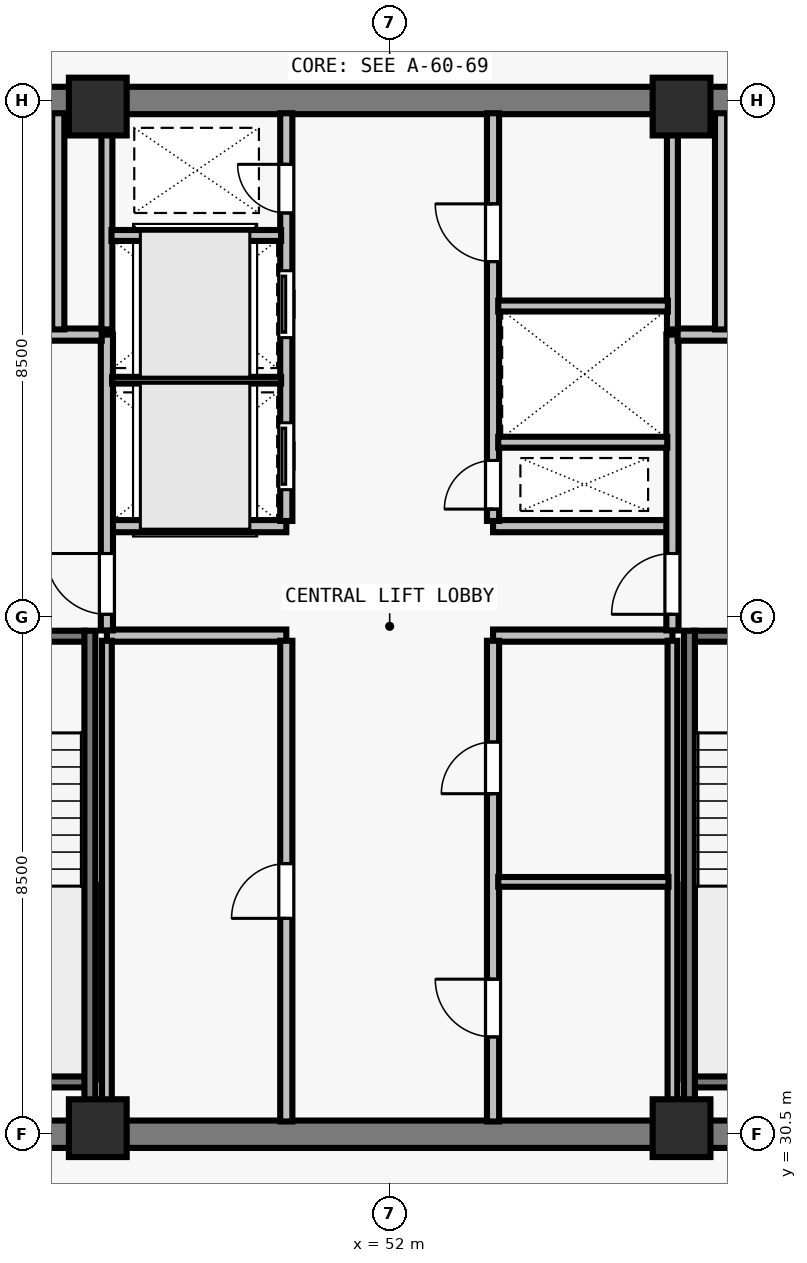
"""IFC4 building model, lengths in metres.
Left out: names, types, materials, properties, quantities, classifications, styles, units other than length and angle.
Written with IfcOpenShell. Run it as: python <this file> out.ifc"""

import sys

from ifc_helpers import new_model, si_unit, direction, frame, frame_2d, origin, origin_2d, place, context, subcontext, project, spatial, rectangle, extrude, element, fill, save


model = new_model("IFC4")
c1 = context("Model", 3, precision=1e-05, world=origin(), true_north=direction((0.0, 1.0)))
c2 = subcontext(c1, "Body", "Model", "MODEL_VIEW")
j1 = project(units=[si_unit("LENGTHUNIT", "METRE"), si_unit("PLANEANGLEUNIT", "RADIAN")], contexts=[c1])
p1 = place(None, origin())
s1 = spatial("IfcSite", under=j1, at=p1, CompositionType="ELEMENT")
p2 = place(p1, origin())
s2 = spatial("IfcBuilding", under=s1, at=p2, CompositionType="ELEMENT")
p3 = place(p2, frame((0.0, 0.0, 241.0)))
s3 = spatial("IfcBuildingStorey", under=s2, at=p3, CompositionType="ELEMENT", Elevation=241.0)
for number, where, z_axis, x_axis in (
    (1, (47.2, 30.6, 0.0), (0.0, 0.0, 1.0), (1.0, 0.0, 0.0)),
    (2, (56.8, 30.6, 0.0), (0.0, 0.0, 1.0), (1.0, 0.0, 0.0)),
    (3, (47.2, 47.4, 0.0), (0.0, 0.0, 1.0), (1.0, 0.0, 0.0)),
    (4, (56.8, 47.4, 0.0), (0.0, 0.0, 1.0), (1.0, 0.0, 0.0)),
):
    element("IfcColumn", number, at=place(p3, frame(where, z_axis=z_axis, x_axis=x_axis)), inside=s3, PredefinedType="COLUMN", context=c2, shape_type="SweptSolid", body=[
        extrude(rectangle(XDim=0.95, YDim=0.95, at=origin_2d()), origin(), (0.0, 0.0, 1.0), 3.5),
    ])
for number, where, z_axis, x_axis in (
    (5, (43.275, 30.5, 0.0), (0.0, 0.0, 1.0), (1.0, 0.0, 0.0)),
    (6, (43.275, 47.5, 0.0), (0.0, 0.0, 1.0), (1.0, 0.0, 0.0)),
):
    element("IfcWall", number, at=place(p3, frame(where, z_axis=z_axis, x_axis=x_axis)), inside=s3, PredefinedType="SHEAR", context=c2, shape_type="SweptSolid", body=[
        extrude(rectangle(XDim=17.45, YDim=0.45, at=frame_2d((8.725, 0.0))), origin(), (0.0, 0.0, 1.0), 3.29),
    ])
for number, where, z_axis, x_axis in (
    (7, (47.35, 38.7, 0.0), (0.0, 0.0, 1.0), (1.0, 0.0, 0.0)),
    (8, (47.35, 40.5, 0.0), (0.0, 0.0, 1.0), (1.0, 0.0, 0.0)),
    (9, (53.7, 38.7, 0.0), (0.0, 0.0, 1.0), (1.0, 0.0, 0.0)),
    (10, (53.7, 40.5, 0.0), (0.0, 0.0, 1.0), (1.0, 0.0, 0.0)),
):
    element("IfcWall", number, at=place(p3, frame(where, z_axis=z_axis, x_axis=x_axis)), inside=s3, PredefinedType="SOLIDWALL", context=c2, shape_type="SweptSolid", body=[
        extrude(rectangle(XDim=2.95, YDim=0.2, at=frame_2d((1.475, 0.0))), origin(), (0.0, 0.0, 1.0), 3.29),
    ])
p4 = place(p3, frame((50.3, 30.71, 0.0), z_axis=(0.0, 0.0, 1.0), x_axis=(0.0, 1.0, 0.0)))
e11 = element("IfcWall", 11, at=p4, inside=s3, PredefinedType="SOLIDWALL", context=c2, shape_type="SweptSolid", body=[
    extrude(rectangle(XDim=7.905, YDim=0.2, at=frame_2d((3.953, 0.0))), origin(), (0.0, 0.0, 1.0), 3.29),
])
p5 = place(p4, frame((3.34, 0.0, 0.0)))
e12 = element("IfcOpeningElement", 12, at=p5, cuts=e11, PredefinedType="OPENING", context=c2, shape_type="SweptSolid", body=[
    extrude(rectangle(XDim=0.9, YDim=2.12, at=frame_2d((0.45, 1.06))), frame((0.0, 0.11, 0.0), z_axis=(0.0, -1.0, 0.0), x_axis=(1.0, 0.0, 0.0)), (0.0, 0.0, 1.0), 0.22),
])
p6 = place(p3, frame((53.7, 30.71, 0.0), z_axis=(0.0, 0.0, 1.0), x_axis=(0.0, 1.0, 0.0)))
e13 = element("IfcWall", 13, at=p6, inside=s3, PredefinedType="SOLIDWALL", context=c2, shape_type="SweptSolid", body=[
    extrude(rectangle(XDim=7.905, YDim=0.2, at=frame_2d((3.953, 0.0))), origin(), (0.0, 0.0, 1.0), 3.29),
])
p7 = place(p6, frame((1.39, 0.0, 0.0)))
e14 = element("IfcOpeningElement", 14, at=p7, cuts=e13, PredefinedType="OPENING", context=c2, shape_type="SweptSolid", body=[
    extrude(rectangle(XDim=0.95, YDim=2.12, at=frame_2d((0.475, 1.06))), frame((0.0, 0.11, 0.0), z_axis=(0.0, -1.0, 0.0), x_axis=(1.0, 0.0, 0.0)), (0.0, 0.0, 1.0), 0.22),
])
p8 = place(p6, frame((5.39, 0.0, 0.0)))
e15 = element("IfcOpeningElement", 15, at=p8, cuts=e13, PredefinedType="OPENING", context=c2, shape_type="SweptSolid", body=[
    extrude(rectangle(XDim=0.85, YDim=2.12, at=frame_2d((0.425, 1.06))), frame((0.0, 0.11, 0.0), z_axis=(0.0, -1.0, 0.0), x_axis=(1.0, 0.0, 0.0)), (0.0, 0.0, 1.0), 0.22),
])
p9 = place(p3, frame((50.3, 40.585, 0.0), z_axis=(0.0, 0.0, 1.0), x_axis=(0.0, 1.0, 0.0)))
e16 = element("IfcWall", 16, at=p9, inside=s3, PredefinedType="SOLIDWALL", context=c2, shape_type="SweptSolid", body=[
    extrude(rectangle(XDim=6.705, YDim=0.2, at=frame_2d((3.353, 0.0))), origin(), (0.0, 0.0, 1.0), 3.29),
])
p10 = place(p9, frame((0.515, 0.0, 0.0)))
e17 = element("IfcOpeningElement", 17, at=p10, cuts=e16, PredefinedType="OPENING", context=c2, shape_type="SweptSolid", body=[
    extrude(rectangle(XDim=1.1, YDim=2.2, at=frame_2d((0.55, 1.1))), frame((0.0, 0.11, 0.0), z_axis=(0.0, -1.0, 0.0), x_axis=(1.0, 0.0, 0.0)), (0.0, 0.0, 1.0), 0.22),
])
p11 = place(p9, frame((3.015, 0.0, 0.0)))
e18 = element("IfcOpeningElement", 18, at=p11, cuts=e16, PredefinedType="OPENING", context=c2, shape_type="SweptSolid", body=[
    extrude(rectangle(XDim=1.1, YDim=2.2, at=frame_2d((0.55, 1.1))), frame((0.0, 0.11, 0.0), z_axis=(0.0, -1.0, 0.0), x_axis=(1.0, 0.0, 0.0)), (0.0, 0.0, 1.0), 0.22),
])
p12 = place(p9, frame((5.065, 0.0, 0.0)))
e19 = element("IfcOpeningElement", 19, at=p12, cuts=e16, PredefinedType="OPENING", context=c2, shape_type="SweptSolid", body=[
    extrude(rectangle(XDim=0.8, YDim=2.08, at=frame_2d((0.4, 1.04))), frame((0.0, 0.11, 0.0), z_axis=(0.0, -1.0, 0.0), x_axis=(1.0, 0.0, 0.0)), (0.0, 0.0, 1.0), 0.22),
])
p13 = place(p3, frame((53.7, 40.585, 0.0), z_axis=(0.0, 0.0, 1.0), x_axis=(0.0, 1.0, 0.0)))
e20 = element("IfcWall", 20, at=p13, inside=s3, PredefinedType="SOLIDWALL", context=c2, shape_type="SweptSolid", body=[
    extrude(rectangle(XDim=6.705, YDim=0.2, at=frame_2d((3.353, 0.0))), origin(), (0.0, 0.0, 1.0), 3.29),
])
p14 = place(p13, frame((0.195, 0.0, 0.0)))
e21 = element("IfcOpeningElement", 21, at=p14, cuts=e20, PredefinedType="OPENING", context=c2, shape_type="SweptSolid", body=[
    extrude(rectangle(XDim=0.8, YDim=2.08, at=frame_2d((0.4, 1.04))), frame((0.0, 0.11, 0.0), z_axis=(0.0, -1.0, 0.0), x_axis=(1.0, 0.0, 0.0)), (0.0, 0.0, 1.0), 0.22),
])
p15 = place(p13, frame((4.265, 0.0, 0.0)))
e22 = element("IfcOpeningElement", 22, at=p15, cuts=e20, PredefinedType="OPENING", context=c2, shape_type="SweptSolid", body=[
    extrude(rectangle(XDim=0.95, YDim=2.12, at=frame_2d((0.475, 1.06))), frame((0.0, 0.11, 0.0), z_axis=(0.0, -1.0, 0.0), x_axis=(1.0, 0.0, 0.0)), (0.0, 0.0, 1.0), 0.22),
])
p16 = place(p3, frame((47.35, 38.785, 0.0), z_axis=(0.0, 0.0, 1.0), x_axis=(0.0, 1.0, 0.0)))
e23 = element("IfcWall", 23, at=p16, inside=s3, PredefinedType="SOLIDWALL", context=c2, shape_type="SweptSolid", body=[
    extrude(rectangle(XDim=4.865, YDim=0.2, at=frame_2d((2.433, 0.0))), origin(), (0.0, 0.0, 1.0), 3.29),
])
p17 = place(p16, frame((0.265, 0.0, 0.0)))
e24 = element("IfcOpeningElement", 24, at=p17, cuts=e23, PredefinedType="OPENING", context=c2, shape_type="SweptSolid", body=[
    extrude(rectangle(XDim=1.0, YDim=2.15, at=frame_2d((0.5, 1.075))), frame((0.0, 0.11, 0.0), z_axis=(0.0, -1.0, 0.0), x_axis=(1.0, 0.0, 0.0)), (0.0, 0.0, 1.0), 0.22),
])
p18 = place(p3, frame((43.71, 43.65, 0.0), z_axis=(0.0, 0.0, 1.0), x_axis=(1.0, 0.0, 0.0)))
e25 = element("IfcWall", 25, at=p18, inside=s3, PredefinedType="SOLIDWALL", context=c2, shape_type="SweptSolid", body=[
    extrude(rectangle(XDim=3.555, YDim=0.2, at=frame_2d((1.777, 0.0))), origin(), (0.0, 0.0, 1.0), 3.29),
])
p19 = place(p18, frame((1.16, 0.0, 0.0)))
e26 = element("IfcOpeningElement", 26, at=p19, cuts=e25, PredefinedType="OPENING", context=c2, shape_type="SweptSolid", body=[
    extrude(rectangle(XDim=1.1, YDim=2.2, at=frame_2d((0.55, 1.1))), frame((0.0, 0.11, 0.0), z_axis=(0.0, -1.0, 0.0), x_axis=(1.0, 0.0, 0.0)), (0.0, 0.0, 1.0), 0.22),
])
p20 = place(p3, frame((46.55, 43.735, 0.0), z_axis=(0.0, 0.0, 1.0), x_axis=(0.0, 1.0, 0.0)))
e27 = element("IfcWall", 27, at=p20, inside=s3, PredefinedType="SOLIDWALL", context=c2, shape_type="SweptSolid", body=[
    extrude(rectangle(XDim=3.555, YDim=0.2, at=frame_2d((1.777, 0.0))), origin(), (0.0, 0.0, 1.0), 3.29),
])
p21 = place(p3, frame((56.65, 38.785, 0.0), z_axis=(0.0, 0.0, 1.0), x_axis=(0.0, 1.0, 0.0)))
e28 = element("IfcWall", 28, at=p21, inside=s3, PredefinedType="SOLIDWALL", context=c2, shape_type="SweptSolid", body=[
    extrude(rectangle(XDim=4.865, YDim=0.2, at=frame_2d((2.433, 0.0))), origin(), (0.0, 0.0, 1.0), 3.29),
])
p22 = place(p21, frame((0.265, 0.0, 0.0)))
e29 = element("IfcOpeningElement", 29, at=p22, cuts=e28, PredefinedType="OPENING", context=c2, shape_type="SweptSolid", body=[
    extrude(rectangle(XDim=1.0, YDim=2.15, at=frame_2d((0.5, 1.075))), frame((0.0, 0.11, 0.0), z_axis=(0.0, -1.0, 0.0), x_axis=(1.0, 0.0, 0.0)), (0.0, 0.0, 1.0), 0.22),
])
p23 = place(p3, frame((56.735, 43.65, 0.0), z_axis=(0.0, 0.0, 1.0), x_axis=(1.0, 0.0, 0.0)))
e30 = element("IfcWall", 30, at=p23, inside=s3, PredefinedType="SOLIDWALL", context=c2, shape_type="SweptSolid", body=[
    extrude(rectangle(XDim=3.555, YDim=0.2, at=frame_2d((1.777, 0.0))), origin(), (0.0, 0.0, 1.0), 3.29),
])
p24 = place(p23, frame((1.295, 0.0, 0.0)))
e31 = element("IfcOpeningElement", 31, at=p24, cuts=e30, PredefinedType="OPENING", context=c2, shape_type="SweptSolid", body=[
    extrude(rectangle(XDim=1.1, YDim=2.2, at=frame_2d((0.55, 1.1))), frame((0.0, 0.11, 0.0), z_axis=(0.0, -1.0, 0.0), x_axis=(1.0, 0.0, 0.0)), (0.0, 0.0, 1.0), 0.22),
])
p25 = place(p3, frame((57.45, 43.735, 0.0), z_axis=(0.0, 0.0, 1.0), x_axis=(0.0, 1.0, 0.0)))
e32 = element("IfcWall", 32, at=p25, inside=s3, PredefinedType="SOLIDWALL", context=c2, shape_type="SweptSolid", body=[
    extrude(rectangle(XDim=3.555, YDim=0.2, at=frame_2d((1.777, 0.0))), origin(), (0.0, 0.0, 1.0), 3.29),
])
for number, where, z_axis, x_axis in (
    (33, (47.35, 30.71, 0.0), (0.0, 0.0, 1.0), (0.0, 1.0, 0.0)),
    (34, (56.65, 30.71, 0.0), (0.0, 0.0, 1.0), (0.0, 1.0, 0.0)),
):
    element("IfcWall", number, at=place(p3, frame(where, z_axis=z_axis, x_axis=x_axis)), inside=s3, PredefinedType="PARTITIONING", context=c2, shape_type="SweptSolid", body=[
        extrude(rectangle(XDim=7.905, YDim=0.16, at=frame_2d((3.953, 0.0))), origin(), (0.0, 0.0, 1.0), 3.29),
    ])
p26 = place(p3, frame((53.785, 34.65, 0.0), z_axis=(0.0, 0.0, 1.0), x_axis=(1.0, 0.0, 0.0)))
e35 = element("IfcWall", 35, at=p26, inside=s3, PredefinedType="PARTITIONING", context=c2, shape_type="SweptSolid", body=[
    extrude(rectangle(XDim=2.8, YDim=0.16, at=frame_2d((1.4, 0.0))), origin(), (0.0, 0.0, 1.0), 3.29),
])
p27 = place(p3, frame((47.35, 43.735, 0.0), z_axis=(0.0, 0.0, 1.0), x_axis=(0.0, 1.0, 0.0)))
e36 = element("IfcWall", 36, at=p27, inside=s3, PredefinedType="SOLIDWALL", context=c2, shape_type="SweptSolid", body=[
    extrude(rectangle(XDim=3.555, YDim=0.18, at=frame_2d((1.777, 0.0))), origin(), (0.0, 0.0, 1.0), 3.29),
])
p28 = place(p3, frame((47.435, 42.9, 0.0), z_axis=(0.0, 0.0, 1.0), x_axis=(1.0, 0.0, 0.0)))
e37 = element("IfcWall", 37, at=p28, inside=s3, PredefinedType="PARTITIONING", context=c2, shape_type="SweptSolid", body=[
    extrude(rectangle(XDim=2.78, YDim=0.11, at=frame_2d((1.39, 0.0))), origin(), (0.0, 0.0, 1.0), 3.29),
])
p29 = place(p3, frame((47.425, 45.28, 0.0), z_axis=(0.0, 0.0, 1.0), x_axis=(1.0, 0.0, 0.0)))
e38 = element("IfcWall", 38, at=p29, inside=s3, PredefinedType="SOLIDWALL", context=c2, shape_type="SweptSolid", body=[
    extrude(rectangle(XDim=2.79, YDim=0.18, at=frame_2d((1.395, 0.0))), origin(), (0.0, 0.0, 1.0), 3.29),
])
p30 = place(p3, frame((56.65, 43.735, 0.0), z_axis=(0.0, 0.0, 1.0), x_axis=(0.0, 1.0, 0.0)))
e39 = element("IfcWall", 39, at=p30, inside=s3, PredefinedType="SOLIDWALL", context=c2, shape_type="SweptSolid", body=[
    extrude(rectangle(XDim=3.555, YDim=0.18, at=frame_2d((1.777, 0.0))), origin(), (0.0, 0.0, 1.0), 3.29),
])
p31 = place(p3, frame((53.785, 41.88, 0.0), z_axis=(0.0, 0.0, 1.0), x_axis=(1.0, 0.0, 0.0)))
e40 = element("IfcWall", 40, at=p31, inside=s3, PredefinedType="SOLIDWALL", context=c2, shape_type="SweptSolid", body=[
    extrude(rectangle(XDim=2.78, YDim=0.18, at=frame_2d((1.39, 0.0))), origin(), (0.0, 0.0, 1.0), 3.29),
])
p32 = place(p3, frame((53.785, 44.12, 0.0), z_axis=(0.0, 0.0, 1.0), x_axis=(1.0, 0.0, 0.0)))
e41 = element("IfcWall", 41, at=p32, inside=s3, PredefinedType="SOLIDWALL", context=c2, shape_type="SweptSolid", body=[
    extrude(rectangle(XDim=2.79, YDim=0.18, at=frame_2d((1.395, 0.0))), origin(), (0.0, 0.0, 1.0), 3.29),
])
p33 = place(p3, frame((43.715, 38.69, 0.0), z_axis=(0.0, 0.0, 1.0), x_axis=(1.0, 0.0, 0.0)))
e42 = element("IfcWall", 42, at=p33, inside=s3, PredefinedType="SOLIDWALL", context=c2, shape_type="SweptSolid", body=[
    extrude(rectangle(XDim=3.28, YDim=0.18, at=frame_2d((1.64, 0.0))), origin(), (0.0, 0.0, 1.0), 3.29),
])
p34 = place(p33, frame((1.165, 0.0, 0.0)))
e43 = element("IfcOpeningElement", 43, at=p34, cuts=e42, PredefinedType="OPENING", context=c2, shape_type="SweptSolid", body=[
    extrude(rectangle(XDim=0.95, YDim=2.15, at=frame_2d((0.475, 1.075))), frame((0.0, 0.1, 0.0), z_axis=(0.0, -1.0, 0.0), x_axis=(1.0, 0.0, 0.0)), (0.0, 0.0, 1.0), 0.2),
])
p35 = place(p3, frame((43.715, 31.36, 0.0), z_axis=(0.0, 0.0, 1.0), x_axis=(1.0, 0.0, 0.0)))
e44 = element("IfcWall", 44, at=p35, inside=s3, PredefinedType="SOLIDWALL", context=c2, shape_type="SweptSolid", body=[
    extrude(rectangle(XDim=3.28, YDim=0.18, at=frame_2d((1.64, 0.0))), origin(), (0.0, 0.0, 1.0), 3.29),
])
p36 = place(p3, frame((47.07, 38.78, 0.0), z_axis=(0.0, 0.0, 1.0), x_axis=(0.0, -1.0, 0.0)))
e45 = element("IfcWall", 45, at=p36, inside=s3, PredefinedType="SOLIDWALL", context=c2, shape_type="SweptSolid", body=[
    extrude(rectangle(XDim=8.067, YDim=0.18, at=frame_2d((4.034, 0.0))), origin(), (0.0, 0.0, 1.0), 3.29),
])
p37 = place(p3, frame((57.005, 38.69, 0.0), z_axis=(0.0, 0.0, 1.0), x_axis=(1.0, 0.0, 0.0)))
e46 = element("IfcWall", 46, at=p37, inside=s3, PredefinedType="SOLIDWALL", context=c2, shape_type="SweptSolid", body=[
    extrude(rectangle(XDim=3.28, YDim=0.18, at=frame_2d((1.64, 0.0))), origin(), (0.0, 0.0, 1.0), 3.29),
])
p38 = place(p37, frame((1.165, 0.0, 0.0)))
e47 = element("IfcOpeningElement", 47, at=p38, cuts=e46, PredefinedType="OPENING", context=c2, shape_type="SweptSolid", body=[
    extrude(rectangle(XDim=0.95, YDim=2.15, at=frame_2d((0.475, 1.075))), frame((0.0, 0.1, 0.0), z_axis=(0.0, -1.0, 0.0), x_axis=(1.0, 0.0, 0.0)), (0.0, 0.0, 1.0), 0.2),
])
p39 = place(p3, frame((57.005, 31.36, 0.0), z_axis=(0.0, 0.0, 1.0), x_axis=(1.0, 0.0, 0.0)))
e48 = element("IfcWall", 48, at=p39, inside=s3, PredefinedType="SOLIDWALL", context=c2, shape_type="SweptSolid", body=[
    extrude(rectangle(XDim=3.28, YDim=0.18, at=frame_2d((1.64, 0.0))), origin(), (0.0, 0.0, 1.0), 3.29),
])
p40 = place(p3, frame((56.93, 38.78, 0.0), z_axis=(0.0, 0.0, 1.0), x_axis=(0.0, -1.0, 0.0)))
e49 = element("IfcWall", 49, at=p40, inside=s3, PredefinedType="SOLIDWALL", context=c2, shape_type="SweptSolid", body=[
    extrude(rectangle(XDim=8.067, YDim=0.18, at=frame_2d((4.034, 0.0))), origin(), (0.0, 0.0, 1.0), 3.29),
])
p41 = place(p17, origin())
e50 = element("IfcDoor", 50, at=p41, inside=s3, OperationType="SINGLE_SWING_RIGHT", PredefinedType="DOOR", context=c2, shape_type="SweptSolid", body=[
    extrude(rectangle(XDim=1.0, YDim=2.15, at=frame_2d((0.5, 1.075))), frame((0.0, 0.025, 0.0), z_axis=(0.0, -1.0, 0.0), x_axis=(1.0, 0.0, 0.0)), (0.0, 0.0, 1.0), 0.05),
])
fill(e24, e50)
p42 = place(p22, origin())
e51 = element("IfcDoor", 51, at=p42, inside=s3, OperationType="SINGLE_SWING_LEFT", PredefinedType="DOOR", context=c2, shape_type="SweptSolid", body=[
    extrude(rectangle(XDim=1.0, YDim=2.15, at=frame_2d((0.5, 1.075))), frame((0.0, 0.025, 0.0), z_axis=(0.0, -1.0, 0.0), x_axis=(1.0, 0.0, 0.0)), (0.0, 0.0, 1.0), 0.05),
])
fill(e29, e51)
p43 = place(p5, origin())
e52 = element("IfcDoor", 52, at=p43, inside=s3, OperationType="SINGLE_SWING_LEFT", PredefinedType="DOOR", context=c2, shape_type="SweptSolid", body=[
    extrude(rectangle(XDim=0.9, YDim=2.12, at=frame_2d((0.45, 1.06))), frame((0.0, 0.025, 0.0), z_axis=(0.0, -1.0, 0.0), x_axis=(1.0, 0.0, 0.0)), (0.0, 0.0, 1.0), 0.05),
])
fill(e12, e52)
p44 = place(p7, origin())
e53 = element("IfcDoor", 53, at=p44, inside=s3, OperationType="SINGLE_SWING_RIGHT", PredefinedType="DOOR", context=c2, shape_type="SweptSolid", body=[
    extrude(rectangle(XDim=0.95, YDim=2.12, at=frame_2d((0.475, 1.06))), frame((0.0, 0.025, 0.0), z_axis=(0.0, -1.0, 0.0), x_axis=(1.0, 0.0, 0.0)), (0.0, 0.0, 1.0), 0.05),
])
fill(e14, e53)
p45 = place(p8, origin())
e54 = element("IfcDoor", 54, at=p45, inside=s3, OperationType="SINGLE_SWING_LEFT", PredefinedType="DOOR", context=c2, shape_type="SweptSolid", body=[
    extrude(rectangle(XDim=0.85, YDim=2.12, at=frame_2d((0.425, 1.06))), frame((0.0, 0.025, 0.0), z_axis=(0.0, -1.0, 0.0), x_axis=(1.0, 0.0, 0.0)), (0.0, 0.0, 1.0), 0.05),
])
fill(e15, e54)
p46 = place(p10, origin())
e55 = element("IfcDoor", 55, at=p46, inside=s3, OperationType="SLIDING_TO_LEFT", PredefinedType="DOOR", context=c2, shape_type="SweptSolid", body=[
    extrude(rectangle(XDim=1.1, YDim=2.2, at=frame_2d((0.55, 1.1))), frame((0.0, 0.025, 0.0), z_axis=(0.0, -1.0, 0.0), x_axis=(1.0, 0.0, 0.0)), (0.0, 0.0, 1.0), 0.05),
])
fill(e17, e55)
p47 = place(p11, origin())
e56 = element("IfcDoor", 56, at=p47, inside=s3, OperationType="SLIDING_TO_LEFT", PredefinedType="DOOR", context=c2, shape_type="SweptSolid", body=[
    extrude(rectangle(XDim=1.1, YDim=2.2, at=frame_2d((0.55, 1.1))), frame((0.0, 0.025, 0.0), z_axis=(0.0, -1.0, 0.0), x_axis=(1.0, 0.0, 0.0)), (0.0, 0.0, 1.0), 0.05),
])
fill(e18, e56)
p48 = place(p12, origin())
e57 = element("IfcDoor", 57, at=p48, inside=s3, OperationType="SINGLE_SWING_RIGHT", PredefinedType="DOOR", context=c2, shape_type="SweptSolid", body=[
    extrude(rectangle(XDim=0.8, YDim=2.08, at=frame_2d((0.4, 1.04))), frame((0.0, 0.025, 0.0), z_axis=(0.0, -1.0, 0.0), x_axis=(1.0, 0.0, 0.0)), (0.0, 0.0, 1.0), 0.05),
])
fill(e19, e57)
p49 = place(p14, origin())
e58 = element("IfcDoor", 58, at=p49, inside=s3, OperationType="SINGLE_SWING_LEFT", PredefinedType="DOOR", context=c2, shape_type="SweptSolid", body=[
    extrude(rectangle(XDim=0.8, YDim=2.08, at=frame_2d((0.4, 1.04))), frame((0.0, 0.025, 0.0), z_axis=(0.0, -1.0, 0.0), x_axis=(1.0, 0.0, 0.0)), (0.0, 0.0, 1.0), 0.05),
])
fill(e21, e58)
p50 = place(p15, origin())
e59 = element("IfcDoor", 59, at=p50, inside=s3, OperationType="SINGLE_SWING_RIGHT", PredefinedType="DOOR", context=c2, shape_type="SweptSolid", body=[
    extrude(rectangle(XDim=0.95, YDim=2.12, at=frame_2d((0.475, 1.06))), frame((0.0, 0.025, 0.0), z_axis=(0.0, -1.0, 0.0), x_axis=(1.0, 0.0, 0.0)), (0.0, 0.0, 1.0), 0.05),
])
fill(e22, e59)
save(model, sys.argv[1])
